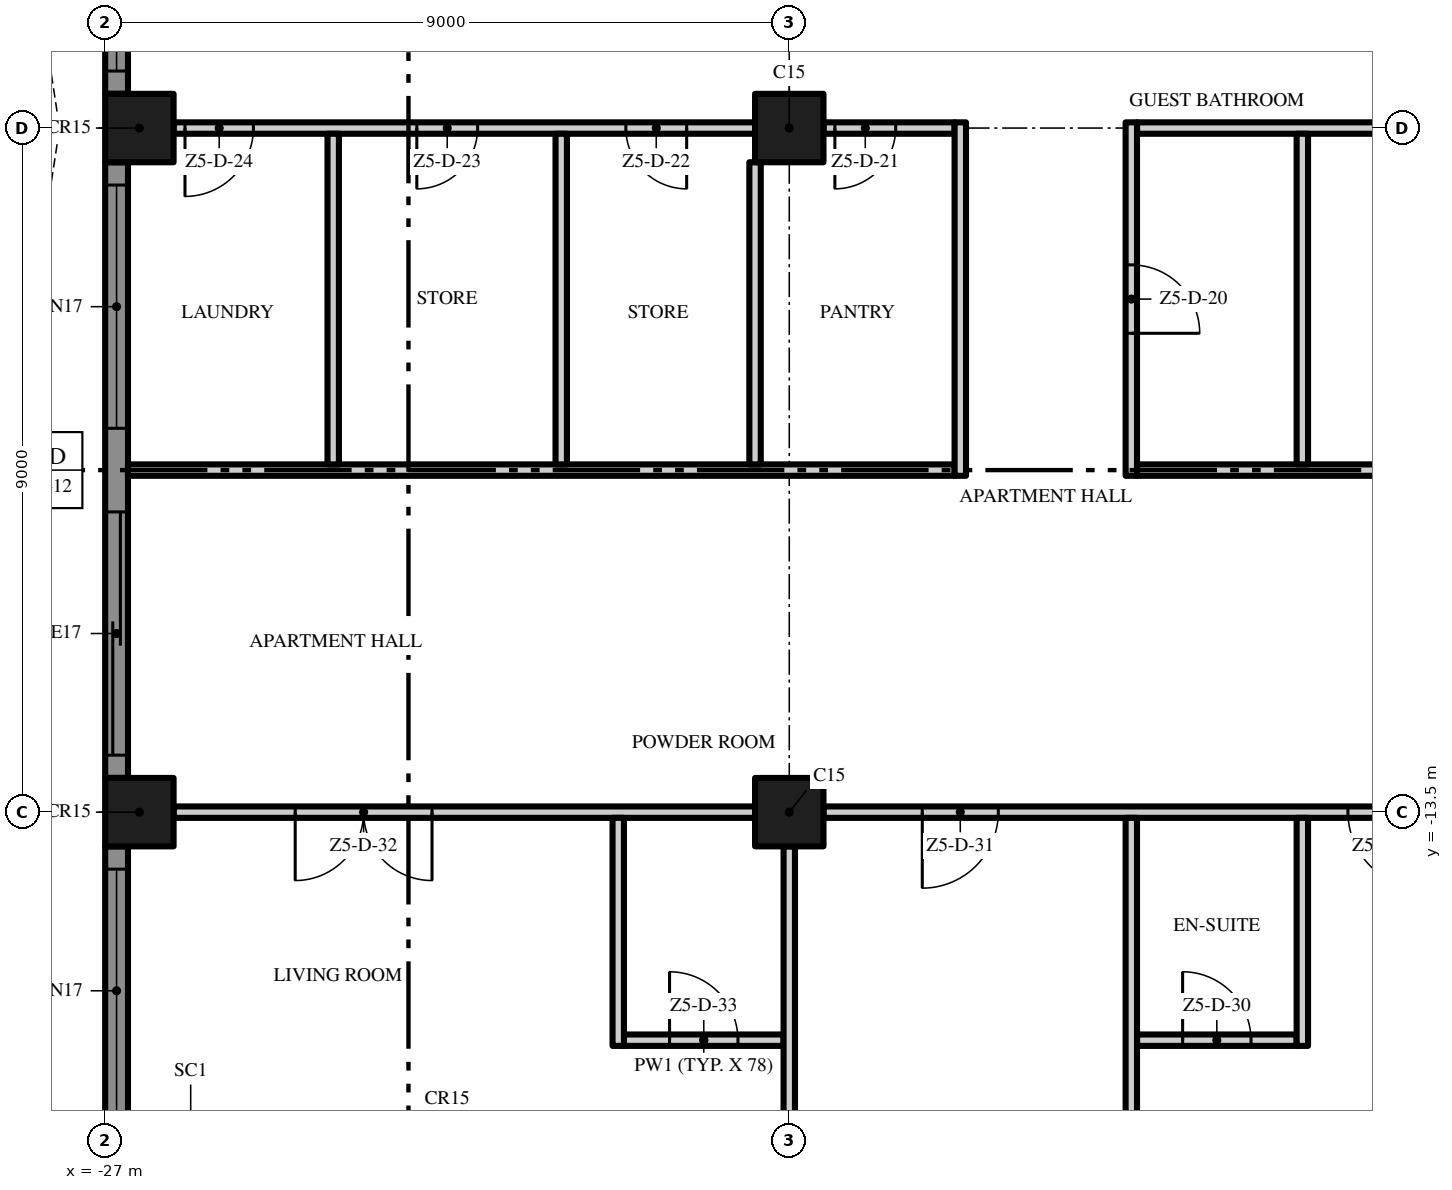
"""IFC4 building model, lengths in metres.
Left out: names, types, materials, properties, quantities, classifications, styles, units other than length and angle.
Written with IfcOpenShell. Run it as: python <this file> out.ifc"""

import sys

from ifc_helpers import new_model, si_unit, direction, frame, frame_2d, origin, origin_2d, place, context, subcontext, project, spatial, polyline, rectangle, outline, extrude, element, fill, save


model = new_model("IFC4")
c1 = context("Model", 3, precision=1e-05, world=origin(), true_north=direction((0.0, 1.0)))
c2 = subcontext(c1, "Body", "Model", "MODEL_VIEW")
j1 = project(units=[si_unit("LENGTHUNIT", "METRE"), si_unit("PLANEANGLEUNIT", "RADIAN")], contexts=[c1])
p1 = place(None, origin())
s1 = spatial("IfcSite", under=j1, at=p1, CompositionType="ELEMENT")
p2 = place(p1, origin())
s2 = spatial("IfcBuilding", under=s1, at=p2, CompositionType="ELEMENT")
p3 = place(p2, frame((0.0, 0.0, 280.6)))
s3 = spatial("IfcBuildingStorey", under=s2, at=p3, CompositionType="ELEMENT", Elevation=280.6)
for number, where, z_axis, x_axis in (
    (1, (-18.0, -13.5, 0.0), (0.0, 0.0, 1.0), (1.0, 0.0, 0.0)),
    (2, (-18.0, -4.5, 0.0), (0.0, 0.0, 1.0), (1.0, 0.0, 0.0)),
    (3, (-26.55, -13.5, 0.0), (0.0, 0.0, 1.0), (1.0, 0.0, 0.0)),
    (4, (-26.55, -4.5, 0.0), (0.0, 0.0, 1.0), (1.0, 0.0, 0.0)),
):
    element("IfcColumn", number, at=place(p3, frame(where, z_axis=z_axis, x_axis=x_axis)), inside=s3, PredefinedType="COLUMN", context=c2, shape_type="SweptSolid", body=[
        extrude(rectangle(XDim=0.9, YDim=0.9, at=origin_2d()), origin(), (0.0, 0.0, 1.0), 3.5),
    ])
p4 = place(p3, frame((-26.85, -4.05, 0.0), z_axis=(0.0, 0.0, 1.0), x_axis=(0.0, 1.0, 0.0)))
e5 = element("IfcWall", 5, at=p4, inside=s3, PredefinedType="SOLIDWALL", context=c2, shape_type="SweptSolid", body=[
    extrude(rectangle(XDim=8.1, YDim=0.3, at=frame_2d((4.05, 0.0))), origin(), (0.0, 0.0, 1.0), 3.5),
])
p5 = place(p4, frame((4.6, 0.0, 0.0)))
e6 = element("IfcOpeningElement", 6, at=p5, cuts=e5, PredefinedType="OPENING", context=c2, shape_type="SweptSolid", body=[
    extrude(rectangle(XDim=3.2, YDim=2.4, at=frame_2d((1.6, 1.2))), frame((0.0, 0.16, 0.0), z_axis=(0.0, -1.0, 0.0), x_axis=(1.0, 0.0, 0.0)), (0.0, 0.0, 1.0), 0.32),
])
p6 = place(p4, frame((0.3, 0.0, 0.45)))
e7 = element("IfcOpeningElement", 7, at=p6, cuts=e5, PredefinedType="OPENING", context=c2, shape_type="SweptSolid", body=[
    extrude(rectangle(XDim=3.2, YDim=2.65, at=frame_2d((1.6, 1.325))), frame((0.0, 0.16, 0.0), z_axis=(0.0, -1.0, 0.0), x_axis=(1.0, 0.0, 0.0)), (0.0, 0.0, 1.0), 0.32),
])
p7 = place(p3, frame((-26.85, -13.05, 0.0), z_axis=(0.0, 0.0, 1.0), x_axis=(0.0, 1.0, 0.0)))
e8 = element("IfcWall", 8, at=p7, inside=s3, PredefinedType="SOLIDWALL", context=c2, shape_type="SweptSolid", body=[
    extrude(rectangle(XDim=8.1, YDim=0.3, at=frame_2d((4.05, 0.0))), origin(), (0.0, 0.0, 1.0), 3.5),
])
p8 = place(p7, frame((4.6, 0.0, 0.45)))
e9 = element("IfcOpeningElement", 9, at=p8, cuts=e8, PredefinedType="OPENING", context=c2, shape_type="SweptSolid", body=[
    extrude(rectangle(XDim=3.2, YDim=2.65, at=frame_2d((1.6, 1.325))), frame((0.0, 0.16, 0.0), z_axis=(0.0, -1.0, 0.0), x_axis=(1.0, 0.0, 0.0)), (0.0, 0.0, 1.0), 0.32),
])
p9 = place(p7, frame((0.3, 0.0, 0.0)))
e10 = element("IfcOpeningElement", 10, at=p9, cuts=e8, PredefinedType="OPENING", context=c2, shape_type="SweptSolid", body=[
    extrude(rectangle(XDim=3.2, YDim=2.4, at=frame_2d((1.6, 1.2))), frame((0.0, 0.16, 0.0), z_axis=(0.0, -1.0, 0.0), x_axis=(1.0, 0.0, 0.0)), (0.0, 0.0, 1.0), 0.32),
])
p10 = place(p3, frame((-26.85, -18.0, 0.0), z_axis=(0.0, 0.0, 1.0), x_axis=(0.0, 1.0, 0.0)))
e11 = element("IfcWall", 11, at=p10, inside=s3, PredefinedType="SOLIDWALL", context=c2, shape_type="SweptSolid", body=[
    extrude(rectangle(XDim=4.05, YDim=0.3, at=frame_2d((2.025, 0.0))), origin(), (0.0, 0.0, 1.0), 3.5),
])
p11 = place(p10, frame((0.55, 0.0, 0.45)))
e12 = element("IfcOpeningElement", 12, at=p11, cuts=e11, PredefinedType="OPENING", context=c2, shape_type="SweptSolid", body=[
    extrude(rectangle(XDim=3.2, YDim=2.65, at=frame_2d((1.6, 1.325))), frame((0.0, 0.16, 0.0), z_axis=(0.0, -1.0, 0.0), x_axis=(1.0, 0.0, 0.0)), (0.0, 0.0, 1.0), 0.32),
])
p12 = place(p3, origin())
e13 = element("IfcWall", 13, at=p12, inside=s3, PredefinedType="USERDEFINED", context=c2, shape_type="SweptSolid", body=[
    extrude(outline(polyline([(-30.0, 18.0), (-29.771, 16.5), (-29.171, 15.0), (-28.429, 13.5), (-27.829, 12.0), (-27.6, 10.5), (-27.829, 9.0), (-28.429, 7.5), (-29.171, 6.0), (-29.771, 4.5), (-30.0, 3.0), (-29.771, 1.5), (-29.171, 0.0), (-28.429, -1.5), (-27.829, -3.0), (-27.6, -4.5), (-27.829, -6.0), (-28.429, -7.5), (-29.171, -9.0), (-29.771, -10.5), (-30.0, -12.0), (-29.771, -13.5), (-29.171, -15.0), (-28.429, -16.5), (-27.829, -18.0), (-27.597, -17.907), (-28.201, -16.398), (-28.942, -14.898), (-29.528, -13.434), (-29.747, -12.0), (-29.528, -10.566), (-28.942, -9.102), (-28.201, -7.602), (-27.586, -6.066), (-27.347, -4.5), (-27.586, -2.934), (-28.201, -1.398), (-28.942, 0.102), (-29.528, 1.566), (-29.747, 3.0), (-29.528, 4.434), (-28.942, 5.898), (-28.201, 7.398), (-27.586, 8.934), (-27.347, 10.5), (-27.586, 12.066), (-28.201, 13.602), (-28.942, 15.102), (-29.528, 16.566), (-29.753, 18.038), (-30.0, 18.0)])), origin(), (0.0, 0.0, 1.0), 0.9),
])
p13 = place(p3, frame((-20.175, -16.5, 0.0), z_axis=(0.0, 0.0, 1.0), x_axis=(1.0, 0.0, 0.0)))
e14 = element("IfcWall", 14, at=p13, inside=s3, PredefinedType="PARTITIONING", context=c2, shape_type="SweptSolid", body=[
    extrude(rectangle(XDim=2.1, YDim=0.15, at=frame_2d((1.05, 0.0))), origin(), (0.0, 0.0, 1.0), 3.5),
])
p14 = place(p13, frame((0.6, 0.0, 0.0)))
e15 = element("IfcOpeningElement", 15, at=p14, cuts=e14, PredefinedType="OPENING", context=c2, shape_type="SweptSolid", body=[
    extrude(rectangle(XDim=0.9, YDim=2.1, at=frame_2d((0.45, 1.05))), frame((0.0, 0.085, 0.0), z_axis=(0.0, -1.0, 0.0), x_axis=(1.0, 0.0, 0.0)), (0.0, 0.0, 1.0), 0.17),
])
p15 = place(p3, frame((-13.425, -16.5, 0.0), z_axis=(0.0, 0.0, 1.0), x_axis=(1.0, 0.0, 0.0)))
e16 = element("IfcWall", 16, at=p15, inside=s3, PredefinedType="PARTITIONING", context=c2, shape_type="SweptSolid", body=[
    extrude(rectangle(XDim=2.1, YDim=0.15, at=frame_2d((1.05, 0.0))), origin(), (0.0, 0.0, 1.0), 3.5),
])
p16 = place(p15, frame((0.6, 0.0, 0.0)))
e17 = element("IfcOpeningElement", 17, at=p16, cuts=e16, PredefinedType="OPENING", context=c2, shape_type="SweptSolid", body=[
    extrude(rectangle(XDim=0.9, YDim=2.1, at=frame_2d((0.45, 1.05))), frame((0.0, 0.085, 0.0), z_axis=(0.0, -1.0, 0.0), x_axis=(1.0, 0.0, 0.0)), (0.0, 0.0, 1.0), 0.17),
])
p17 = place(p3, frame((-18.45, -13.5, 0.0), z_axis=(0.0, 0.0, 1.0), x_axis=(-1.0, 0.0, 0.0)))
e18 = element("IfcWall", 18, at=p17, inside=s3, PredefinedType="PARTITIONING", context=c2, shape_type="SweptSolid", body=[
    extrude(rectangle(XDim=7.65, YDim=0.15, at=frame_2d((3.825, 0.0))), origin(), (0.0, 0.0, 1.0), 3.5),
])
p18 = place(p17, frame((4.25, 0.0, 0.0)))
e19 = element("IfcOpeningElement", 19, at=p18, cuts=e18, PredefinedType="OPENING", context=c2, shape_type="SweptSolid", body=[
    extrude(rectangle(XDim=1.8, YDim=2.4, at=frame_2d((0.9, 1.2))), frame((0.0, 0.085, 0.0), z_axis=(0.0, -1.0, 0.0), x_axis=(1.0, 0.0, 0.0)), (0.0, 0.0, 1.0), 0.17),
])
p19 = place(p3, frame((-9.45, -13.5, 0.0), z_axis=(0.0, 0.0, 1.0), x_axis=(-1.0, 0.0, 0.0)))
e20 = element("IfcWall", 20, at=p19, inside=s3, PredefinedType="PARTITIONING", context=c2, shape_type="SweptSolid", body=[
    extrude(rectangle(XDim=8.1, YDim=0.15, at=frame_2d((4.05, 0.0))), origin(), (0.0, 0.0, 1.0), 3.5),
])
p20 = place(p19, frame((0.2, 0.0, 0.0)))
e21 = element("IfcOpeningElement", 21, at=p20, cuts=e20, PredefinedType="OPENING", context=c2, shape_type="SweptSolid", body=[
    extrude(rectangle(XDim=1.0, YDim=2.4, at=frame_2d((0.5, 1.2))), frame((0.0, 0.085, 0.0), z_axis=(0.0, -1.0, 0.0), x_axis=(1.0, 0.0, 0.0)), (0.0, 0.0, 1.0), 0.17),
])
p21 = place(p19, frame((5.8, 0.0, 0.0)))
e22 = element("IfcOpeningElement", 22, at=p21, cuts=e20, PredefinedType="OPENING", context=c2, shape_type="SweptSolid", body=[
    extrude(rectangle(XDim=1.0, YDim=2.4, at=frame_2d((0.5, 1.2))), frame((0.0, 0.085, 0.0), z_axis=(0.0, -1.0, 0.0), x_axis=(1.0, 0.0, 0.0)), (0.0, 0.0, 1.0), 0.17),
])
p22 = place(p3, frame((-26.7, -9.0, 0.0), z_axis=(0.0, 0.0, 1.0), x_axis=(1.0, 0.0, 0.0)))
e23 = element("IfcWall", 23, at=p22, inside=s3, PredefinedType="PARTITIONING", context=c2, shape_type="SweptSolid", body=[
    extrude(rectangle(XDim=10.875, YDim=0.15, at=frame_2d((5.438, 0.0))), origin(), (0.0, 0.0, 1.0), 3.5),
])
p23 = place(p3, frame((-13.425, -9.0, 0.0), z_axis=(0.0, 0.0, 1.0), x_axis=(1.0, 0.0, 0.0)))
e24 = element("IfcWall", 24, at=p23, inside=s3, PredefinedType="PARTITIONING", context=c2, shape_type="SweptSolid", body=[
    extrude(rectangle(XDim=13.325, YDim=0.15, at=frame_2d((6.662, 0.0))), origin(), (0.0, 0.0, 1.0), 3.5),
])
p24 = place(p23, frame((4.675, 0.0, 0.0)))
e25 = element("IfcOpeningElement", 25, at=p24, cuts=e24, PredefinedType="OPENING", context=c2, shape_type="SweptSolid", body=[
    extrude(rectangle(XDim=1.0, YDim=2.4, at=frame_2d((0.5, 1.2))), frame((0.0, 0.085, 0.0), z_axis=(0.0, -1.0, 0.0), x_axis=(1.0, 0.0, 0.0)), (0.0, 0.0, 1.0), 0.17),
])
p25 = place(p3, frame((-18.45, -4.5, 0.0), z_axis=(0.0, 0.0, 1.0), x_axis=(-1.0, 0.0, 0.0)))
e26 = element("IfcWall", 26, at=p25, inside=s3, PredefinedType="PARTITIONING", context=c2, shape_type="SweptSolid", body=[
    extrude(rectangle(XDim=7.65, YDim=0.15, at=frame_2d((3.825, 0.0))), origin(), (0.0, 0.0, 1.0), 3.5),
])
p26 = place(p25, frame((0.9, 0.0, 0.0)))
e27 = element("IfcOpeningElement", 27, at=p26, cuts=e26, PredefinedType="OPENING", context=c2, shape_type="SweptSolid", body=[
    extrude(rectangle(XDim=0.8, YDim=2.0, at=frame_2d((0.4, 1.0))), frame((0.0, 0.085, 0.0), z_axis=(0.0, -1.0, 0.0), x_axis=(1.0, 0.0, 0.0)), (0.0, 0.0, 1.0), 0.17),
])
p27 = place(p25, frame((3.65, 0.0, 0.0)))
e28 = element("IfcOpeningElement", 28, at=p27, cuts=e26, PredefinedType="OPENING", context=c2, shape_type="SweptSolid", body=[
    extrude(rectangle(XDim=0.8, YDim=2.0, at=frame_2d((0.4, 1.0))), frame((0.0, 0.085, 0.0), z_axis=(0.0, -1.0, 0.0), x_axis=(1.0, 0.0, 0.0)), (0.0, 0.0, 1.0), 0.17),
])
p28 = place(p25, frame((6.6, 0.0, 0.0)))
e29 = element("IfcOpeningElement", 29, at=p28, cuts=e26, PredefinedType="OPENING", context=c2, shape_type="SweptSolid", body=[
    extrude(rectangle(XDim=0.9, YDim=2.1, at=frame_2d((0.45, 1.05))), frame((0.0, 0.085, 0.0), z_axis=(0.0, -1.0, 0.0), x_axis=(1.0, 0.0, 0.0)), (0.0, 0.0, 1.0), 0.17),
])
p29 = place(p3, frame((-15.825, -4.5, 0.0), z_axis=(0.0, 0.0, 1.0), x_axis=(-1.0, 0.0, 0.0)))
e30 = element("IfcWall", 30, at=p29, inside=s3, PredefinedType="PARTITIONING", context=c2, shape_type="SweptSolid", body=[
    extrude(rectangle(XDim=1.725, YDim=0.15, at=frame_2d((0.863, 0.0))), origin(), (0.0, 0.0, 1.0), 3.5),
])
p30 = place(p29, frame((0.775, 0.0, 0.0)))
e31 = element("IfcOpeningElement", 31, at=p30, cuts=e30, PredefinedType="OPENING", context=c2, shape_type="SweptSolid", body=[
    extrude(rectangle(XDim=0.8, YDim=2.0, at=frame_2d((0.4, 1.0))), frame((0.0, 0.085, 0.0), z_axis=(0.0, -1.0, 0.0), x_axis=(1.0, 0.0, 0.0)), (0.0, 0.0, 1.0), 0.17),
])
p31 = place(p3, frame((-13.425, -4.5, 0.0), z_axis=(0.0, 0.0, 1.0), x_axis=(1.0, 0.0, 0.0)))
e32 = element("IfcWall", 32, at=p31, inside=s3, PredefinedType="PARTITIONING", context=c2, shape_type="SweptSolid", body=[
    extrude(rectangle(XDim=3.975, YDim=0.15, at=frame_2d((1.988, 0.0))), origin(), (0.0, 0.0, 1.0), 3.5),
])
for number, where, z_axis, x_axis in (
    (33, (-24.0, -8.925, 0.0), (0.0, 0.0, 1.0), (0.0, 1.0, 0.0)),
    (34, (-21.0, -8.925, 0.0), (0.0, 0.0, 1.0), (0.0, 1.0, 0.0)),
):
    element("IfcWall", number, at=place(p3, frame(where, z_axis=z_axis, x_axis=x_axis)), inside=s3, PredefinedType="PARTITIONING", context=c2, shape_type="SweptSolid", body=[
        extrude(rectangle(XDim=4.35, YDim=0.15, at=frame_2d((2.175, 0.0))), origin(), (0.0, 0.0, 1.0), 3.5),
    ])
p32 = place(p3, frame((-20.25, -16.575, 0.0), z_axis=(0.0, 0.0, 1.0), x_axis=(0.0, 1.0, 0.0)))
e35 = element("IfcWall", 35, at=p32, inside=s3, PredefinedType="PARTITIONING", context=c2, shape_type="SweptSolid", body=[
    extrude(rectangle(XDim=3.0, YDim=0.15, at=frame_2d((1.5, 0.0))), origin(), (0.0, 0.0, 1.0), 3.5),
])
p33 = place(p3, frame((-18.45, -8.925, 0.0), z_axis=(0.0, 0.0, 1.0), x_axis=(0.0, 1.0, 0.0)))
e36 = element("IfcWall", 36, at=p33, inside=s3, PredefinedType="PARTITIONING", context=c2, shape_type="SweptSolid", body=[
    extrude(rectangle(XDim=3.975, YDim=0.15, at=frame_2d((1.988, 0.0))), origin(), (0.0, 0.0, 1.0), 3.5),
])
p34 = place(p3, frame((-18.0, -21.6, 0.0), z_axis=(0.0, 0.0, 1.0), x_axis=(0.0, 1.0, 0.0)))
e37 = element("IfcWall", 37, at=p34, inside=s3, PredefinedType="PARTITIONING", context=c2, shape_type="SweptSolid", body=[
    extrude(rectangle(XDim=7.65, YDim=0.15, at=frame_2d((3.825, 0.0))), origin(), (0.0, 0.0, 1.0), 3.5),
])
p35 = place(p3, frame((-15.75, -9.075, 0.0), z_axis=(0.0, 0.0, 1.0), x_axis=(0.0, 1.0, 0.0)))
e38 = element("IfcWall", 38, at=p35, inside=s3, PredefinedType="PARTITIONING", context=c2, shape_type="SweptSolid", body=[
    extrude(rectangle(XDim=4.65, YDim=0.15, at=frame_2d((2.325, 0.0))), origin(), (0.0, 0.0, 1.0), 3.5),
])
p36 = place(p3, frame((-13.5, -22.2, 0.0), z_axis=(0.0, 0.0, 1.0), x_axis=(0.0, 1.0, 0.0)))
e39 = element("IfcWall", 39, at=p36, inside=s3, PredefinedType="PARTITIONING", context=c2, shape_type="SweptSolid", body=[
    extrude(rectangle(XDim=8.625, YDim=0.15, at=frame_2d((4.312, 0.0))), origin(), (0.0, 0.0, 1.0), 3.5),
])
p37 = place(p3, frame((-13.5, -4.425, 0.0), z_axis=(0.0, 0.0, 1.0), x_axis=(0.0, -1.0, 0.0)))
e40 = element("IfcWall", 40, at=p37, inside=s3, PredefinedType="PARTITIONING", context=c2, shape_type="SweptSolid", body=[
    extrude(rectangle(XDim=4.65, YDim=0.15, at=frame_2d((2.325, 0.0))), origin(), (0.0, 0.0, 1.0), 3.5),
])
p38 = place(p37, frame((1.875, 0.0, 0.0)))
e41 = element("IfcOpeningElement", 41, at=p38, cuts=e40, PredefinedType="OPENING", context=c2, shape_type="SweptSolid", body=[
    extrude(rectangle(XDim=0.9, YDim=2.1, at=frame_2d((0.45, 1.05))), frame((0.0, 0.085, 0.0), z_axis=(0.0, -1.0, 0.0), x_axis=(1.0, 0.0, 0.0)), (0.0, 0.0, 1.0), 0.17),
])
p39 = place(p3, frame((-11.25, -16.575, 0.0), z_axis=(0.0, 0.0, 1.0), x_axis=(0.0, 1.0, 0.0)))
e42 = element("IfcWall", 42, at=p39, inside=s3, PredefinedType="PARTITIONING", context=c2, shape_type="SweptSolid", body=[
    extrude(rectangle(XDim=3.0, YDim=0.15, at=frame_2d((1.5, 0.0))), origin(), (0.0, 0.0, 1.0), 3.5),
])
p40 = place(p3, frame((-11.25, -8.925, 0.0), z_axis=(0.0, 0.0, 1.0), x_axis=(0.0, 1.0, 0.0)))
e43 = element("IfcWall", 43, at=p40, inside=s3, PredefinedType="PARTITIONING", context=c2, shape_type="SweptSolid", body=[
    extrude(rectangle(XDim=4.35, YDim=0.15, at=frame_2d((2.175, 0.0))), origin(), (0.0, 0.0, 1.0), 3.5),
])
p41 = place(p6, origin())
e44 = element("IfcWindow", 44, at=p41, inside=s3, PartitioningType="SINGLE_PANEL", PredefinedType="WINDOW", context=c2, shape_type="SweptSolid", body=[
    extrude(rectangle(XDim=3.2, YDim=2.65, at=frame_2d((1.6, 1.325))), frame((0.0, 0.03, 0.0), z_axis=(0.0, -1.0, 0.0), x_axis=(1.0, 0.0, 0.0)), (0.0, 0.0, 1.0), 0.06),
])
fill(e7, e44)
p42 = place(p8, origin())
e45 = element("IfcWindow", 45, at=p42, inside=s3, PartitioningType="SINGLE_PANEL", PredefinedType="WINDOW", context=c2, shape_type="SweptSolid", body=[
    extrude(rectangle(XDim=3.2, YDim=2.65, at=frame_2d((1.6, 1.325))), frame((0.0, 0.03, 0.0), z_axis=(0.0, -1.0, 0.0), x_axis=(1.0, 0.0, 0.0)), (0.0, 0.0, 1.0), 0.06),
])
fill(e9, e45)
p43 = place(p9, origin())
e46 = element("IfcDoor", 46, at=p43, inside=s3, OperationType="SINGLE_SWING_LEFT", PredefinedType="DOOR", context=c2, shape_type="SweptSolid", body=[
    extrude(rectangle(XDim=3.2, YDim=2.4, at=frame_2d((1.6, 1.2))), frame((0.0, 0.025, 0.0), z_axis=(0.0, -1.0, 0.0), x_axis=(1.0, 0.0, 0.0)), (0.0, 0.0, 1.0), 0.05),
])
fill(e10, e46)
p44 = place(p11, origin())
e47 = element("IfcWindow", 47, at=p44, inside=s3, PartitioningType="SINGLE_PANEL", PredefinedType="WINDOW", context=c2, shape_type="SweptSolid", body=[
    extrude(rectangle(XDim=3.2, YDim=2.65, at=frame_2d((1.6, 1.325))), frame((0.0, 0.03, 0.0), z_axis=(0.0, -1.0, 0.0), x_axis=(1.0, 0.0, 0.0)), (0.0, 0.0, 1.0), 0.06),
])
fill(e12, e47)
p45 = place(p38, origin())
e48 = element("IfcDoor", 48, at=p45, inside=s3, OperationType="SINGLE_SWING_RIGHT", PredefinedType="DOOR", context=c2, shape_type="SweptSolid", body=[
    extrude(rectangle(XDim=0.9, YDim=2.1, at=frame_2d((0.45, 1.05))), frame((0.0, 0.025, 0.0), z_axis=(0.0, -1.0, 0.0), x_axis=(1.0, 0.0, 0.0)), (0.0, 0.0, 1.0), 0.05),
])
fill(e41, e48)
p46 = place(p30, origin())
e49 = element("IfcDoor", 49, at=p46, inside=s3, OperationType="SINGLE_SWING_RIGHT", PredefinedType="DOOR", context=c2, shape_type="SweptSolid", body=[
    extrude(rectangle(XDim=0.8, YDim=2.0, at=frame_2d((0.4, 1.0))), frame((0.0, 0.025, 0.0), z_axis=(0.0, -1.0, 0.0), x_axis=(1.0, 0.0, 0.0)), (0.0, 0.0, 1.0), 0.05),
])
fill(e31, e49)
p47 = place(p26, origin())
e50 = element("IfcDoor", 50, at=p47, inside=s3, OperationType="SINGLE_SWING_LEFT", PredefinedType="DOOR", context=c2, shape_type="SweptSolid", body=[
    extrude(rectangle(XDim=0.8, YDim=2.0, at=frame_2d((0.4, 1.0))), frame((0.0, 0.025, 0.0), z_axis=(0.0, -1.0, 0.0), x_axis=(1.0, 0.0, 0.0)), (0.0, 0.0, 1.0), 0.05),
])
fill(e27, e50)
p48 = place(p27, origin())
e51 = element("IfcDoor", 51, at=p48, inside=s3, OperationType="SINGLE_SWING_RIGHT", PredefinedType="DOOR", context=c2, shape_type="SweptSolid", body=[
    extrude(rectangle(XDim=0.8, YDim=2.0, at=frame_2d((0.4, 1.0))), frame((0.0, 0.025, 0.0), z_axis=(0.0, -1.0, 0.0), x_axis=(1.0, 0.0, 0.0)), (0.0, 0.0, 1.0), 0.05),
])
fill(e28, e51)
p49 = place(p28, origin())
e52 = element("IfcDoor", 52, at=p49, inside=s3, OperationType="SINGLE_SWING_RIGHT", PredefinedType="DOOR", context=c2, shape_type="SweptSolid", body=[
    extrude(rectangle(XDim=0.9, YDim=2.1, at=frame_2d((0.45, 1.05))), frame((0.0, 0.025, 0.0), z_axis=(0.0, -1.0, 0.0), x_axis=(1.0, 0.0, 0.0)), (0.0, 0.0, 1.0), 0.05),
])
fill(e29, e52)
p50 = place(p20, origin())
e53 = element("IfcDoor", 53, at=p50, inside=s3, OperationType="SINGLE_SWING_LEFT", PredefinedType="DOOR", context=c2, shape_type="SweptSolid", body=[
    extrude(rectangle(XDim=1.0, YDim=2.4, at=frame_2d((0.5, 1.2))), frame((0.0, 0.025, 0.0), z_axis=(0.0, -1.0, 0.0), x_axis=(1.0, 0.0, 0.0)), (0.0, 0.0, 1.0), 0.05),
])
fill(e21, e53)
p51 = place(p16, origin())
e54 = element("IfcDoor", 54, at=p51, inside=s3, OperationType="SINGLE_SWING_LEFT", PredefinedType="DOOR", context=c2, shape_type="SweptSolid", body=[
    extrude(rectangle(XDim=0.9, YDim=2.1, at=frame_2d((0.45, 1.05))), frame((0.0, 0.025, 0.0), z_axis=(0.0, -1.0, 0.0), x_axis=(1.0, 0.0, 0.0)), (0.0, 0.0, 1.0), 0.05),
])
fill(e17, e54)
p52 = place(p21, origin())
e55 = element("IfcDoor", 55, at=p52, inside=s3, OperationType="SINGLE_SWING_RIGHT", PredefinedType="DOOR", context=c2, shape_type="SweptSolid", body=[
    extrude(rectangle(XDim=1.0, YDim=2.4, at=frame_2d((0.5, 1.2))), frame((0.0, 0.025, 0.0), z_axis=(0.0, -1.0, 0.0), x_axis=(1.0, 0.0, 0.0)), (0.0, 0.0, 1.0), 0.05),
])
fill(e22, e55)
p53 = place(p18, origin())
e56 = element("IfcDoor", 56, at=p53, inside=s3, OperationType="DOUBLE_DOOR_SINGLE_SWING", PredefinedType="DOOR", context=c2, shape_type="SweptSolid", body=[
    extrude(rectangle(XDim=1.8, YDim=2.4, at=frame_2d((0.9, 1.2))), frame((0.0, 0.025, 0.0), z_axis=(0.0, -1.0, 0.0), x_axis=(1.0, 0.0, 0.0)), (0.0, 0.0, 1.0), 0.05),
])
fill(e19, e56)
p54 = place(p14, origin())
e57 = element("IfcDoor", 57, at=p54, inside=s3, OperationType="SINGLE_SWING_LEFT", PredefinedType="DOOR", context=c2, shape_type="SweptSolid", body=[
    extrude(rectangle(XDim=0.9, YDim=2.1, at=frame_2d((0.45, 1.05))), frame((0.0, 0.025, 0.0), z_axis=(0.0, -1.0, 0.0), x_axis=(1.0, 0.0, 0.0)), (0.0, 0.0, 1.0), 0.05),
])
fill(e15, e57)
save(model, sys.argv[1])
